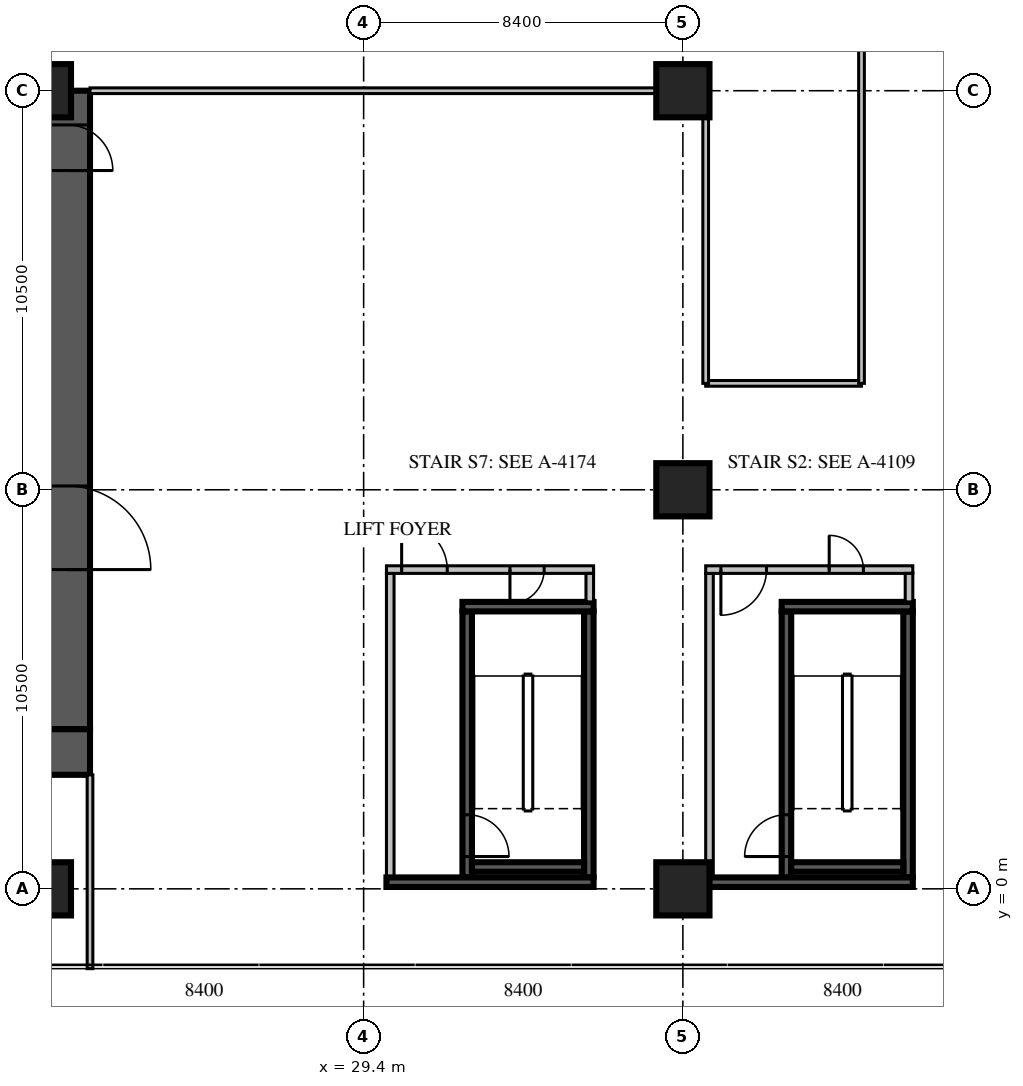
"""IFC4 building model, lengths in metres.
Left out: names, types, materials, properties, quantities, classifications, styles, units other than length and angle.
Written with IfcOpenShell. Run it as: python <this file> out.ifc"""

import sys

from ifc_helpers import new_model, si_unit, direction, frame, frame_2d, origin, origin_2d, place, context, subcontext, project, spatial, rectangle, extrude, source, transform, mapped, element, fill, save


model = new_model("IFC4")
c1 = context("Model", 3, precision=1e-05, world=origin(), true_north=direction((0.0, 1.0)))
c2 = subcontext(c1, "Body", "Model", "MODEL_VIEW")
j1 = project(units=[si_unit("LENGTHUNIT", "METRE"), si_unit("PLANEANGLEUNIT", "RADIAN")], contexts=[c1])
p1 = place(None, origin())
s1 = spatial("IfcSite", under=j1, at=p1, CompositionType="ELEMENT")
p2 = place(p1, origin())
s2 = spatial("IfcBuilding", under=s1, at=p2, CompositionType="ELEMENT")
p3 = place(p2, frame((0.0, 0.0, 18.3)))
s3 = spatial("IfcBuildingStorey", under=s2, at=p3, CompositionType="ELEMENT", Elevation=18.3)
m1 = source(origin(), c2, "Body", "SweptSolid", [
    extrude(rectangle(XDim=1.4, YDim=1.4, at=origin_2d()), origin(), (0.0, 0.0, 1.0), 5.4),
])
for number, where, z_axis, x_axis in (
    (1, (21.0, 0.0, 0.0), (0.0, 0.0, 1.0), (1.0, 0.0, 0.0)),
    (2, (21.0, 21.0, 0.0), (0.0, 0.0, 1.0), (1.0, 0.0, 0.0)),
    (3, (37.8, 0.0, 0.0), (0.0, 0.0, 1.0), (1.0, 0.0, 0.0)),
    (4, (37.8, 10.5, 0.0), (0.0, 0.0, 1.0), (1.0, 0.0, 0.0)),
    (5, (37.8, 21.0, 0.0), (0.0, 0.0, 1.0), (1.0, 0.0, 0.0)),
):
    element("IfcColumn", number, at=place(p3, frame(where, z_axis=z_axis, x_axis=x_axis)), inside=s3, PredefinedType="COLUMN", context=c2, shape_type="MappedRepresentation", body=[
        mapped(m1, transform((0.0, 0.0, 0.0), scale=1.0)),
    ])
m2 = source(origin(), c2, "Body", "SweptSolid", [
    extrude(rectangle(XDim=16.8, YDim=1.2, at=frame_2d((8.4, 0.0))), origin(), (0.0, 0.0, 1.0), 5.4),
])
p4 = place(p3, frame((21.6, 4.2, 0.0), z_axis=(0.0, 0.0, 1.0), x_axis=(0.0, 1.0, 0.0)))
e6 = element("IfcWall", 6, at=p4, inside=s3, PredefinedType="SHEAR", context=c2, shape_type="MappedRepresentation", body=[
    mapped(m2, transform((0.0, 0.0, 0.0), scale=1.0)),
])
m3 = source(origin(), c2, "Body", "SweptSolid", [
    extrude(rectangle(XDim=2.2, YDim=2.1, at=frame_2d((1.1, 1.05))), frame((0.0, 0.61, 0.0), z_axis=(0.0, -1.0, 0.0), x_axis=(1.0, 0.0, 0.0)), (0.0, 0.0, 1.0), 1.22),
])
p5 = place(p4, frame((4.2, 0.0, 0.0)))
e7 = element("IfcOpeningElement", 7, at=p5, cuts=e6, PredefinedType="OPENING", context=c2, shape_type="MappedRepresentation", body=[
    mapped(m3, transform((0.0, 0.0, 0.0), scale=1.0)),
])
m4 = source(origin(), c2, "Body", "SweptSolid", [
    extrude(rectangle(XDim=1.2, YDim=2.1, at=frame_2d((0.6, 1.05))), frame((0.0, 0.61, 0.0), z_axis=(0.0, -1.0, 0.0), x_axis=(1.0, 0.0, 0.0)), (0.0, 0.0, 1.0), 1.22),
])
p6 = place(p4, frame((14.7, 0.0, 0.0)))
e8 = element("IfcOpeningElement", 8, at=p6, cuts=e6, PredefinedType="OPENING", context=c2, shape_type="MappedRepresentation", body=[
    mapped(m4, transform((0.0, 0.0, 0.0), scale=1.0)),
])
m5 = source(origin(), c2, "Body", "SweptSolid", [
    extrude(rectangle(XDim=18.0, YDim=1.2, at=frame_2d((9.0, 0.0))), origin(), (0.0, 0.0, 1.0), 5.4),
])
p7 = place(p3, frame((4.2, 3.6, 0.0), z_axis=(0.0, 0.0, 1.0), x_axis=(1.0, 0.0, 0.0)))
e9 = element("IfcWall", 9, at=p7, inside=s3, PredefinedType="SHEAR", context=c2, shape_type="MappedRepresentation", body=[
    mapped(m5, transform((0.0, 0.0, 0.0), scale=1.0)),
])
m6 = source(origin(), c2, "Body", "SweptSolid", [
    extrude(rectangle(XDim=7.0, YDim=0.25, at=frame_2d((3.5, 0.0))), origin(), (0.0, 0.0, 1.0), 4.8),
])
p8 = place(p3, frame((40.525, 0.3, 0.0), z_axis=(0.0, 0.0, 1.0), x_axis=(0.0, 1.0, 0.0)))
e10 = element("IfcWall", 10, at=p8, inside=s3, PredefinedType="SOLIDWALL", context=c2, shape_type="MappedRepresentation", body=[
    mapped(m6, transform((0.0, 0.0, 0.0), scale=1.0)),
])
m7 = source(origin(), c2, "Body", "SweptSolid", [
    extrude(rectangle(XDim=1.1, YDim=2.1, at=frame_2d((0.55, 1.05))), frame((0.0, 0.135, 0.0), z_axis=(0.0, -1.0, 0.0), x_axis=(1.0, 0.0, 0.0)), (0.0, 0.0, 1.0), 0.27),
])
p9 = place(p8, frame((0.55, 0.0, 0.0)))
e11 = element("IfcOpeningElement", 11, at=p9, cuts=e10, PredefinedType="OPENING", context=c2, shape_type="MappedRepresentation", body=[
    mapped(m7, transform((0.0, 0.0, 0.0), scale=1.0)),
])
p10 = place(p3, frame((43.725, 0.3, 0.0), z_axis=(0.0, 0.0, 1.0), x_axis=(0.0, 1.0, 0.0)))
e12 = element("IfcWall", 12, at=p10, inside=s3, PredefinedType="SOLIDWALL", context=c2, shape_type="MappedRepresentation", body=[
    mapped(m6, transform((0.0, 0.0, 0.0), scale=1.0)),
])
m8 = source(origin(), c2, "Body", "SweptSolid", [
    extrude(rectangle(XDim=3.45, YDim=0.25, at=frame_2d((1.725, 0.0))), origin(), (0.0, 0.0, 1.0), 4.8),
])
p11 = place(p3, frame((40.4, 7.425, 0.0), z_axis=(0.0, 0.0, 1.0), x_axis=(1.0, 0.0, 0.0)))
e13 = element("IfcWall", 13, at=p11, inside=s3, PredefinedType="SOLIDWALL", context=c2, shape_type="MappedRepresentation", body=[
    mapped(m8, transform((0.0, 0.0, 0.0), scale=1.0)),
])
m9 = source(origin(), c2, "Body", "SweptSolid", [
    extrude(rectangle(XDim=2.95, YDim=0.25, at=frame_2d((1.475, 0.0))), origin(), (0.0, 0.0, 1.0), 4.8),
])
p12 = place(p3, frame((40.65, 0.575, 0.0), z_axis=(0.0, 0.0, 1.0), x_axis=(1.0, 0.0, 0.0)))
e14 = element("IfcWall", 14, at=p12, inside=s3, PredefinedType="SOLIDWALL", context=c2, shape_type="MappedRepresentation", body=[
    mapped(m9, transform((0.0, 0.0, 0.0), scale=1.0)),
])
m10 = source(origin(), c2, "Body", "SweptSolid", [
    extrude(rectangle(XDim=8.0, YDim=0.2, at=frame_2d((4.0, 0.0))), origin(), (0.0, 0.0, 1.0), 4.8),
])
p13 = place(p3, frame((38.5, 0.3, 0.0), z_axis=(0.0, 0.0, 1.0), x_axis=(0.0, 1.0, 0.0)))
e15 = element("IfcWall", 15, at=p13, inside=s3, PredefinedType="PARTITIONING", context=c2, shape_type="MappedRepresentation", body=[
    mapped(m10, transform((0.0, 0.0, 0.0), scale=1.0)),
])
m11 = source(origin(), c2, "Body", "SweptSolid", [
    extrude(rectangle(XDim=5.45, YDim=0.2, at=frame_2d((2.725, 0.0))), origin(), (0.0, 0.0, 1.0), 4.8),
])
p14 = place(p3, frame((38.4, 8.4, 0.0), z_axis=(0.0, 0.0, 1.0), x_axis=(1.0, 0.0, 0.0)))
e16 = element("IfcWall", 16, at=p14, inside=s3, PredefinedType="PARTITIONING", context=c2, shape_type="MappedRepresentation", body=[
    mapped(m11, transform((0.0, 0.0, 0.0), scale=1.0)),
])
m12 = source(origin(), c2, "Body", "SweptSolid", [
    extrude(rectangle(XDim=1.2, YDim=2.1, at=frame_2d((0.6, 1.05))), frame((0.0, 0.11, 0.0), z_axis=(0.0, -1.0, 0.0), x_axis=(1.0, 0.0, 0.0)), (0.0, 0.0, 1.0), 0.22),
])
p15 = place(p14, frame((0.4, 0.0, 0.0)))
e17 = element("IfcOpeningElement", 17, at=p15, cuts=e16, PredefinedType="OPENING", context=c2, shape_type="MappedRepresentation", body=[
    mapped(m12, transform((0.0, 0.0, 0.0), scale=1.0)),
])
m13 = source(origin(), c2, "Body", "SweptSolid", [
    extrude(rectangle(XDim=0.9, YDim=2.1, at=frame_2d((0.45, 1.05))), frame((0.0, 0.11, 0.0), z_axis=(0.0, -1.0, 0.0), x_axis=(1.0, 0.0, 0.0)), (0.0, 0.0, 1.0), 0.22),
])
p16 = place(p14, frame((3.25, 0.0, 0.0)))
e18 = element("IfcOpeningElement", 18, at=p16, cuts=e16, PredefinedType="OPENING", context=c2, shape_type="MappedRepresentation", body=[
    mapped(m13, transform((0.0, 0.0, 0.0), scale=1.0)),
])
m14 = source(origin(), c2, "Body", "SweptSolid", [
    extrude(rectangle(XDim=0.75, YDim=0.2, at=frame_2d((0.375, 0.0))), origin(), (0.0, 0.0, 1.0), 4.8),
])
p17 = place(p3, frame((43.75, 7.55, 0.0), z_axis=(0.0, 0.0, 1.0), x_axis=(0.0, 1.0, 0.0)))
e19 = element("IfcWall", 19, at=p17, inside=s3, PredefinedType="PARTITIONING", context=c2, shape_type="MappedRepresentation", body=[
    mapped(m14, transform((0.0, 0.0, 0.0), scale=1.0)),
])
m15 = source(origin(), c2, "Body", "SweptSolid", [
    extrude(rectangle(XDim=5.45, YDim=0.25, at=frame_2d((2.725, 0.0))), origin(), (0.0, 0.0, 1.0), 4.8),
])
p18 = place(p3, frame((38.4, 0.175, 0.0), z_axis=(0.0, 0.0, 1.0), x_axis=(1.0, 0.0, 0.0)))
e20 = element("IfcWall", 20, at=p18, inside=s3, PredefinedType="SOLIDWALL", context=c2, shape_type="MappedRepresentation", body=[
    mapped(m15, transform((0.0, 0.0, 0.0), scale=1.0)),
])
p19 = place(p3, frame((32.125, 0.3, 0.0), z_axis=(0.0, 0.0, 1.0), x_axis=(0.0, 1.0, 0.0)))
e21 = element("IfcWall", 21, at=p19, inside=s3, PredefinedType="SOLIDWALL", context=c2, shape_type="MappedRepresentation", body=[
    mapped(m6, transform((0.0, 0.0, 0.0), scale=1.0)),
])
p20 = place(p19, frame((0.55, 0.0, 0.0)))
e22 = element("IfcOpeningElement", 22, at=p20, cuts=e21, PredefinedType="OPENING", context=c2, shape_type="MappedRepresentation", body=[
    mapped(m7, transform((0.0, 0.0, 0.0), scale=1.0)),
])
p21 = place(p3, frame((35.325, 0.3, 0.0), z_axis=(0.0, 0.0, 1.0), x_axis=(0.0, 1.0, 0.0)))
e23 = element("IfcWall", 23, at=p21, inside=s3, PredefinedType="SOLIDWALL", context=c2, shape_type="MappedRepresentation", body=[
    mapped(m6, transform((0.0, 0.0, 0.0), scale=1.0)),
])
p22 = place(p3, frame((32.0, 7.425, 0.0), z_axis=(0.0, 0.0, 1.0), x_axis=(1.0, 0.0, 0.0)))
e24 = element("IfcWall", 24, at=p22, inside=s3, PredefinedType="SOLIDWALL", context=c2, shape_type="MappedRepresentation", body=[
    mapped(m8, transform((0.0, 0.0, 0.0), scale=1.0)),
])
p23 = place(p3, frame((32.25, 0.575, 0.0), z_axis=(0.0, 0.0, 1.0), x_axis=(1.0, 0.0, 0.0)))
e25 = element("IfcWall", 25, at=p23, inside=s3, PredefinedType="SOLIDWALL", context=c2, shape_type="MappedRepresentation", body=[
    mapped(m9, transform((0.0, 0.0, 0.0), scale=1.0)),
])
p24 = place(p3, frame((30.1, 0.3, 0.0), z_axis=(0.0, 0.0, 1.0), x_axis=(0.0, 1.0, 0.0)))
e26 = element("IfcWall", 26, at=p24, inside=s3, PredefinedType="PARTITIONING", context=c2, shape_type="MappedRepresentation", body=[
    mapped(m10, transform((0.0, 0.0, 0.0), scale=1.0)),
])
p25 = place(p3, frame((30.0, 8.4, 0.0), z_axis=(0.0, 0.0, 1.0), x_axis=(1.0, 0.0, 0.0)))
e27 = element("IfcWall", 27, at=p25, inside=s3, PredefinedType="PARTITIONING", context=c2, shape_type="MappedRepresentation", body=[
    mapped(m11, transform((0.0, 0.0, 0.0), scale=1.0)),
])
p26 = place(p25, frame((0.4, 0.0, 0.0)))
e28 = element("IfcOpeningElement", 28, at=p26, cuts=e27, PredefinedType="OPENING", context=c2, shape_type="MappedRepresentation", body=[
    mapped(m12, transform((0.0, 0.0, 0.0), scale=1.0)),
])
p27 = place(p25, frame((3.25, 0.0, 0.0)))
e29 = element("IfcOpeningElement", 29, at=p27, cuts=e27, PredefinedType="OPENING", context=c2, shape_type="MappedRepresentation", body=[
    mapped(m13, transform((0.0, 0.0, 0.0), scale=1.0)),
])
p28 = place(p3, frame((35.35, 7.55, 0.0), z_axis=(0.0, 0.0, 1.0), x_axis=(0.0, 1.0, 0.0)))
e30 = element("IfcWall", 30, at=p28, inside=s3, PredefinedType="PARTITIONING", context=c2, shape_type="MappedRepresentation", body=[
    mapped(m14, transform((0.0, 0.0, 0.0), scale=1.0)),
])
p29 = place(p3, frame((30.0, 0.175, 0.0), z_axis=(0.0, 0.0, 1.0), x_axis=(1.0, 0.0, 0.0)))
e31 = element("IfcWall", 31, at=p29, inside=s3, PredefinedType="SOLIDWALL", context=c2, shape_type="MappedRepresentation", body=[
    mapped(m15, transform((0.0, 0.0, 0.0), scale=1.0)),
])
m16 = source(origin(), c2, "Body", "SweptSolid", [
    extrude(rectangle(XDim=4.1, YDim=0.15, at=frame_2d((2.05, 0.0))), origin(), (0.0, 0.0, 1.0), 4.8),
])
p30 = place(p3, frame((38.4, 13.3, 0.0), z_axis=(0.0, 0.0, 1.0), x_axis=(1.0, 0.0, 0.0)))
e32 = element("IfcWall", 32, at=p30, inside=s3, PredefinedType="PARTITIONING", context=c2, shape_type="MappedRepresentation", body=[
    mapped(m16, transform((0.0, 0.0, 0.0), scale=1.0)),
])
m17 = source(origin(), c2, "Body", "SweptSolid", [
    extrude(rectangle(XDim=16.2, YDim=0.15, at=frame_2d((8.1, 0.0))), origin(), (0.0, 0.0, 1.0), 4.8),
])
p31 = place(p3, frame((22.2, 21.0, 0.0), z_axis=(0.0, 0.0, 1.0), x_axis=(1.0, 0.0, 0.0)))
e33 = element("IfcWall", 33, at=p31, inside=s3, PredefinedType="PARTITIONING", context=c2, shape_type="MappedRepresentation", body=[
    mapped(m17, transform((0.0, 0.0, 0.0), scale=1.0)),
])
m18 = source(origin(), c2, "Body", "SweptSolid", [
    extrude(rectangle(XDim=5.1, YDim=0.15, at=frame_2d((2.55, 0.0))), origin(), (0.0, 0.0, 1.0), 4.8),
])
p32 = place(p3, frame((22.2, -2.1, 0.0), z_axis=(0.0, 0.0, 1.0), x_axis=(0.0, 1.0, 0.0)))
e34 = element("IfcWall", 34, at=p32, inside=s3, PredefinedType="PARTITIONING", context=c2, shape_type="MappedRepresentation", body=[
    mapped(m18, transform((0.0, 0.0, 0.0), scale=1.0)),
])
m19 = source(origin(), c2, "Body", "SweptSolid", [
    extrude(rectangle(XDim=7.7, YDim=0.15, at=frame_2d((3.85, 0.0))), origin(), (0.0, 0.0, 1.0), 4.8),
])
p33 = place(p3, frame((38.4, 13.3, 0.0), z_axis=(0.0, 0.0, 1.0), x_axis=(0.0, 1.0, 0.0)))
e35 = element("IfcWall", 35, at=p33, inside=s3, PredefinedType="PARTITIONING", context=c2, shape_type="MappedRepresentation", body=[
    mapped(m19, transform((0.0, 0.0, 0.0), scale=1.0)),
])
m20 = source(origin(), c2, "Body", "SweptSolid", [
    extrude(rectangle(XDim=29.2, YDim=0.15, at=frame_2d((14.6, 0.0))), origin(), (0.0, 0.0, 1.0), 4.8),
])
p34 = place(p3, frame((42.5, 13.3, 0.0), z_axis=(0.0, 0.0, 1.0), x_axis=(0.0, 1.0, 0.0)))
e36 = element("IfcWall", 36, at=p34, inside=s3, PredefinedType="PARTITIONING", context=c2, shape_type="MappedRepresentation", body=[
    mapped(m20, transform((0.0, 0.0, 0.0), scale=1.0)),
])
m21 = source(origin(), c2, "Body", "SweptSolid", [
    extrude(rectangle(XDim=1.8, YDim=2.1, at=frame_2d((0.9, 1.05))), frame((0.0, 0.085, 0.0), z_axis=(0.0, -1.0, 0.0), x_axis=(1.0, 0.0, 0.0)), (0.0, 0.0, 1.0), 0.17),
])
p35 = place(p34, frame((13.7, 0.0, 0.0)))
e37 = element("IfcOpeningElement", 37, at=p35, cuts=e36, PredefinedType="OPENING", context=c2, shape_type="MappedRepresentation", body=[
    mapped(m21, transform((0.0, 0.0, 0.0), scale=1.0)),
])
m22 = source(origin(), c2, "Body", "SweptSolid", [
    extrude(rectangle(XDim=1.1, YDim=2.1, at=frame_2d((0.55, 1.05))), frame((0.0, 0.025, 0.0), z_axis=(0.0, -1.0, 0.0), x_axis=(1.0, 0.0, 0.0)), (0.0, 0.0, 1.0), 0.05),
])
p36 = place(p9, origin())
e38 = element("IfcDoor", 38, at=p36, inside=s3, OperationType="SINGLE_SWING_LEFT", PredefinedType="DOOR", context=c2, shape_type="MappedRepresentation", body=[
    mapped(m22, transform((0.0, 0.0, 0.0), scale=1.0)),
])
fill(e11, e38)
m23 = source(origin(), c2, "Body", "SweptSolid", [
    extrude(rectangle(XDim=1.2, YDim=2.1, at=frame_2d((0.6, 1.05))), frame((0.0, 0.025, 0.0), z_axis=(0.0, -1.0, 0.0), x_axis=(1.0, 0.0, 0.0)), (0.0, 0.0, 1.0), 0.05),
])
p37 = place(p15, origin())
e39 = element("IfcDoor", 39, at=p37, inside=s3, OperationType="SINGLE_SWING_RIGHT", PredefinedType="DOOR", context=c2, shape_type="MappedRepresentation", body=[
    mapped(m23, transform((0.0, 0.0, 0.0), scale=1.0)),
])
fill(e17, e39)
m24 = source(origin(), c2, "Body", "SweptSolid", [
    extrude(rectangle(XDim=0.9, YDim=2.1, at=frame_2d((0.45, 1.05))), frame((0.0, 0.025, 0.0), z_axis=(0.0, -1.0, 0.0), x_axis=(1.0, 0.0, 0.0)), (0.0, 0.0, 1.0), 0.05),
])
p38 = place(p16, origin())
e40 = element("IfcDoor", 40, at=p38, inside=s3, OperationType="SINGLE_SWING_LEFT", PredefinedType="DOOR", context=c2, shape_type="MappedRepresentation", body=[
    mapped(m24, transform((0.0, 0.0, 0.0), scale=1.0)),
])
fill(e18, e40)
p39 = place(p20, origin())
e41 = element("IfcDoor", 41, at=p39, inside=s3, OperationType="SINGLE_SWING_RIGHT", PredefinedType="DOOR", context=c2, shape_type="MappedRepresentation", body=[
    mapped(m22, transform((0.0, 0.0, 0.0), scale=1.0)),
])
fill(e22, e41)
p40 = place(p26, origin())
e42 = element("IfcDoor", 42, at=p40, inside=s3, OperationType="SINGLE_SWING_LEFT", PredefinedType="DOOR", context=c2, shape_type="MappedRepresentation", body=[
    mapped(m23, transform((0.0, 0.0, 0.0), scale=1.0)),
])
fill(e28, e42)
p41 = place(p27, origin())
e43 = element("IfcDoor", 43, at=p41, inside=s3, OperationType="SINGLE_SWING_RIGHT", PredefinedType="DOOR", context=c2, shape_type="MappedRepresentation", body=[
    mapped(m24, transform((0.0, 0.0, 0.0), scale=1.0)),
])
fill(e29, e43)
m25 = source(origin(), c2, "Body", "SweptSolid", [
    extrude(rectangle(XDim=2.2, YDim=2.1, at=frame_2d((1.1, 1.05))), frame((0.0, 0.025, 0.0), z_axis=(0.0, -1.0, 0.0), x_axis=(1.0, 0.0, 0.0)), (0.0, 0.0, 1.0), 0.05),
])
p42 = place(p5, origin())
e44 = element("IfcDoor", 44, at=p42, inside=s3, OperationType="DOUBLE_DOOR_SINGLE_SWING", PredefinedType="DOOR", context=c2, shape_type="MappedRepresentation", body=[
    mapped(m25, transform((0.0, 0.0, 0.0), scale=1.0)),
])
fill(e7, e44)
p43 = place(p6, origin())
e45 = element("IfcDoor", 45, at=p43, inside=s3, OperationType="SINGLE_SWING_RIGHT", PredefinedType="DOOR", context=c2, shape_type="MappedRepresentation", body=[
    mapped(m23, transform((0.0, 0.0, 0.0), scale=1.0)),
])
fill(e8, e45)
save(model, sys.argv[1])
